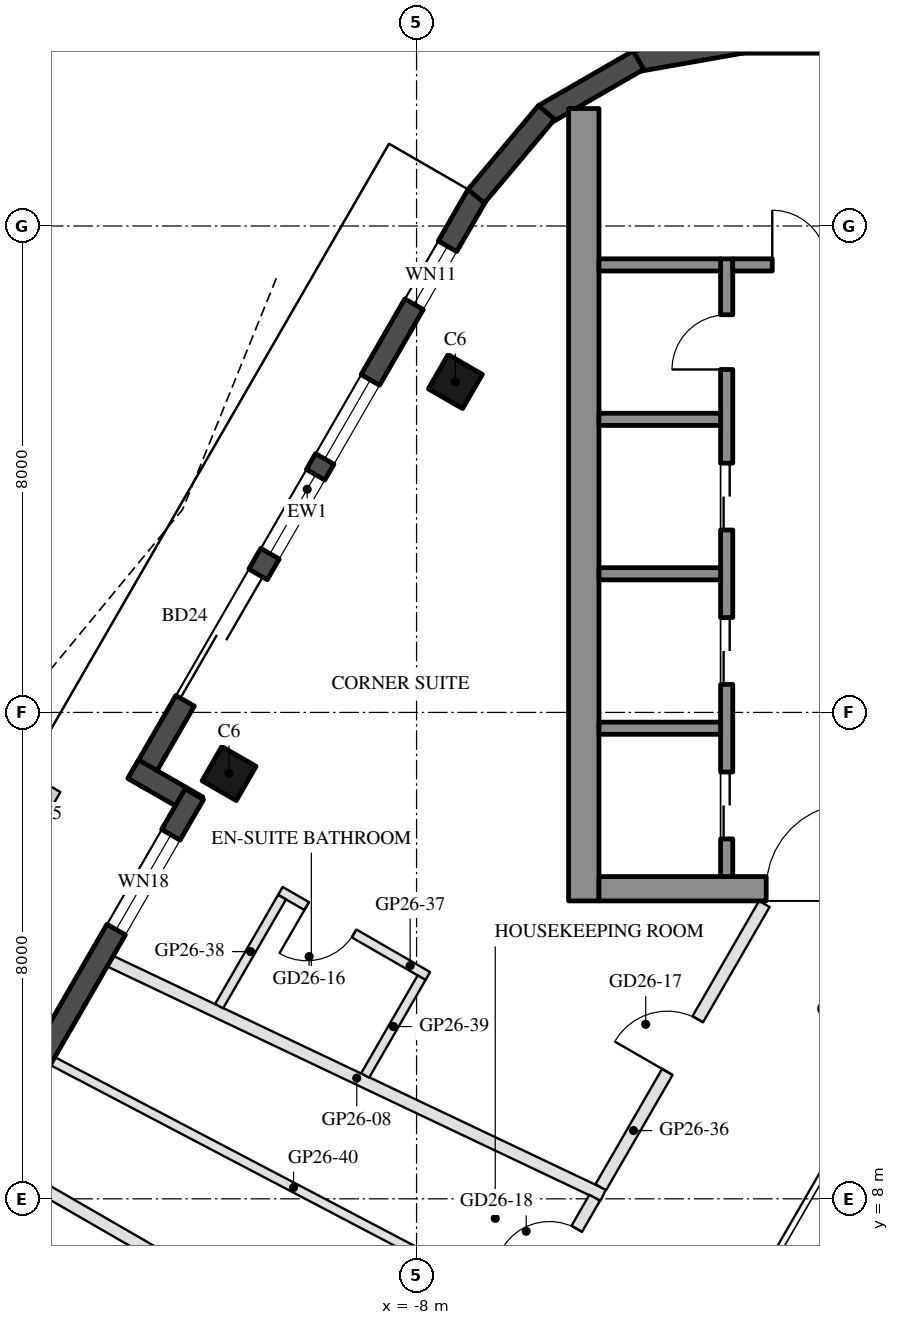
"""IFC4 building model, lengths in metres.
Left out: names, types, materials, properties, quantities, classifications, styles, units other than length and angle.
Written with IfcOpenShell. Run it as: python <this file> out.ifc"""

import sys

from ifc_helpers import new_model, si_unit, direction, frame, frame_2d, origin, origin_2d, place, context, subcontext, project, spatial, rectangle, hollow_rectangle, extrude, boolean, halfspace, element, fill, save


model = new_model("IFC4")
c1 = context("Model", 3, precision=1e-05, world=origin(), true_north=direction((0.0, 1.0)))
c2 = subcontext(c1, "Body", "Model", "MODEL_VIEW")
j1 = project(units=[si_unit("LENGTHUNIT", "METRE"), si_unit("PLANEANGLEUNIT", "RADIAN")], contexts=[c1])
p1 = place(None, origin())
s1 = spatial("IfcSite", under=j1, at=p1, CompositionType="ELEMENT")
p2 = place(p1, origin())
s2 = spatial("IfcBuilding", under=s1, at=p2, CompositionType="ELEMENT")
p3 = place(p2, frame((0.0, 0.0, 272.6)))
s3 = spatial("IfcBuildingStorey", under=s2, at=p3, CompositionType="ELEMENT", Elevation=272.6)
p4 = place(p3, frame((-7.362, 21.44, 0.0), z_axis=(0.0, 0.0, 1.0), x_axis=(0.5, 0.866025403784, 0.0)))
e1 = element("IfcColumn", 1, at=p4, inside=s3, PredefinedType="COLUMN", context=c2, shape_type="SweptSolid", body=[
    boolean("DIFFERENCE", extrude(hollow_rectangle(XDim=0.65, YDim=0.65, WallThickness=0.03, at=origin_2d()), origin(), (0.0, 0.0, 1.0), 3.7), halfspace(frame((0.0, 0.0, 3.653), z_axis=(0.0, 0.0, 1.0), x_axis=(1.0, 0.0, 0.0)), False)),
])
p5 = place(p3, frame((-11.083, 14.994, 0.0), z_axis=(0.0, 0.0, 1.0), x_axis=(0.5, 0.866025403784, 0.0)))
e2 = element("IfcColumn", 2, at=p5, inside=s3, PredefinedType="COLUMN", context=c2, shape_type="SweptSolid", body=[
    boolean("DIFFERENCE", extrude(hollow_rectangle(XDim=0.65, YDim=0.65, WallThickness=0.03, at=origin_2d()), origin(), (0.0, 0.0, 1.0), 3.7), halfspace(frame((0.0, 0.0, 3.66), z_axis=(0.0, 0.0, 1.0), x_axis=(1.0, 0.0, 0.0)), False)),
])
p6 = place(p3, frame((-7.002, 24.514, 0.0), z_axis=(0.0, 0.0, 1.0), x_axis=(-0.500000830309, -0.866024924405, 0.0)))
e3 = element("IfcWall", 3, at=p6, inside=s3, PredefinedType="SOLIDWALL", context=c2, shape_type="SweptSolid", body=[
    extrude(rectangle(XDim=11.185, YDim=0.35, at=frame_2d((5.593, 0.0))), origin(), (0.0, 0.0, 1.0), 3.55),
])
p7 = place(p6, frame((0.979, 0.0, 0.3)))
e4 = element("IfcOpeningElement", 4, at=p7, cuts=e3, PredefinedType="OPENING", context=c2, shape_type="SweptSolid", body=[
    extrude(rectangle(XDim=1.1, YDim=2.65, at=frame_2d((0.55, 1.325))), frame((0.0, 0.185, 0.0), z_axis=(0.0, -1.0, 0.0), x_axis=(1.0, 0.0, 0.0)), (0.0, 0.0, 1.0), 0.37),
])
p8 = place(p6, frame((7.21, 0.0, 0.0)))
e5 = element("IfcOpeningElement", 5, at=p8, cuts=e3, PredefinedType="OPENING", context=c2, shape_type="SweptSolid", body=[
    extrude(rectangle(XDim=2.4, YDim=2.4, at=frame_2d((1.2, 1.2))), frame((0.0, 0.185, 0.0), z_axis=(0.0, -1.0, 0.0), x_axis=(1.0, 0.0, 0.0)), (0.0, 0.0, 1.0), 0.37),
])
p9 = place(p6, frame((3.517, 0.0, 0.3)))
e6 = element("IfcOpeningElement", 6, at=p9, cuts=e3, PredefinedType="OPENING", context=c2, shape_type="SweptSolid", body=[
    extrude(rectangle(XDim=1.5, YDim=2.65, at=frame_2d((0.75, 1.325))), frame((0.0, 0.185, 0.0), z_axis=(0.0, -1.0, 0.0), x_axis=(1.0, 0.0, 0.0)), (0.0, 0.0, 1.0), 0.37),
])
p10 = place(p6, frame((5.316, 0.0, 0.3)))
e7 = element("IfcOpeningElement", 7, at=p10, cuts=e3, PredefinedType="OPENING", context=c2, shape_type="SweptSolid", body=[
    extrude(rectangle(XDim=1.5, YDim=2.65, at=frame_2d((0.75, 1.325))), frame((0.0, 0.185, 0.0), z_axis=(0.0, -1.0, 0.0), x_axis=(1.0, 0.0, 0.0)), (0.0, 0.0, 1.0), 0.37),
])
p11 = place(p3, frame((-12.659, 15.066, 0.0), z_axis=(0.0, 0.0, 1.0), x_axis=(0.866005645448, -0.500034220881, 0.0)))
e8 = element("IfcWall", 8, at=p11, inside=s3, PredefinedType="SOLIDWALL", context=c2, shape_type="SweptSolid", body=[
    extrude(rectangle(XDim=1.22, YDim=0.35, at=frame_2d((0.61, 0.0))), origin(), (0.0, 0.0, 1.0), 3.55),
])
p12 = place(p3, frame((-11.655, 14.655, 0.0), z_axis=(0.0, 0.0, 1.0), x_axis=(-0.499995993298, -0.866027717042, 0.0)))
e9 = element("IfcWall", 9, at=p12, inside=s3, PredefinedType="SOLIDWALL", context=c2, shape_type="SweptSolid", body=[
    extrude(rectangle(XDim=6.284, YDim=0.35, at=frame_2d((3.142, 0.0))), origin(), (0.0, 0.0, 1.0), 3.55),
])
p13 = place(p12, frame((0.77, 0.0, 0.3)))
e10 = element("IfcOpeningElement", 10, at=p13, cuts=e9, PredefinedType="OPENING", context=c2, shape_type="SweptSolid", body=[
    extrude(rectangle(XDim=1.8, YDim=2.65, at=frame_2d((0.9, 1.325))), frame((0.0, 0.185, 0.0), z_axis=(0.0, -1.0, 0.0), x_axis=(1.0, 0.0, 0.0)), (0.0, 0.0, 1.0), 0.37),
])
p14 = place(p3, frame((2.666, 27.018, 0.0), z_axis=(0.0, 0.0, 1.0), x_axis=(-1.0, 0.0, 0.0)))
e11 = element("IfcWall", 11, at=p14, inside=s3, PredefinedType="SOLIDWALL", context=c2, shape_type="SweptSolid", body=[
    extrude(rectangle(XDim=5.331, YDim=0.35, at=frame_2d((2.666, 0.0))), origin(), (0.0, 0.0, 1.0), 3.55),
])
for number, where, z_axis, x_axis in (
    (12, (-2.635, 27.02, 0.0), (0.0, 0.0, 1.0), (-0.985, -0.174, 0.0)),
    (13, (-4.351, 26.729, 0.0), (0.0, 0.0, 1.0), (-0.866, -0.5, 0.0)),
):
    element("IfcWall", number, at=place(p3, frame(where, z_axis=z_axis, x_axis=x_axis)), inside=s3, PredefinedType="SOLIDWALL", context=c2, shape_type="SweptSolid", body=[
        extrude(rectangle(XDim=1.8, YDim=0.35, at=frame_2d((0.9, 0.0))), origin(), (0.0, 0.0, 1.0), 3.55),
    ])
p15 = place(p3, frame((-5.863, 25.868, 0.0), z_axis=(0.0, 0.0, 1.0), x_axis=(-0.642756114672, -0.766070869471, 0.0)))
e14 = element("IfcWall", 14, at=p15, inside=s3, PredefinedType="SOLIDWALL", context=c2, shape_type="SweptSolid", body=[
    extrude(rectangle(XDim=1.8, YDim=0.35, at=frame_2d((0.9, 0.0))), origin(), (0.0, 0.0, 1.0), 3.55),
])
p16 = place(p3, frame((-5.25, 12.9, 0.0), z_axis=(0.0, 0.0, 1.0), x_axis=(0.0, 1.0, 0.0)))
e15 = element("IfcWall", 15, at=p16, inside=s3, PredefinedType="SHEAR", context=c2, shape_type="SweptSolid", body=[
    extrude(rectangle(XDim=13.031, YDim=0.5, at=frame_2d((6.516, 0.0))), origin(), (0.0, 0.0, 1.0), 3.5),
])
p17 = place(p3, frame((5.0, 13.1, 0.0), z_axis=(0.0, 0.0, 1.0), x_axis=(-1.0, 0.0, 0.0)))
e16 = element("IfcWall", 16, at=p17, inside=s3, PredefinedType="SHEAR", context=c2, shape_type="SweptSolid", body=[
    extrude(rectangle(XDim=10.0, YDim=0.4, at=frame_2d((5.0, 0.0))), origin(), (0.0, 0.0, 1.0), 3.5),
])
p18 = place(p17, frame((3.55, 0.0, 0.0)))
e17 = element("IfcOpeningElement", 17, at=p18, cuts=e16, PredefinedType="OPENING", context=c2, shape_type="SweptSolid", body=[
    extrude(rectangle(XDim=1.1, YDim=2.1, at=frame_2d((0.55, 1.05))), frame((0.0, 0.21, 0.0), z_axis=(0.0, -1.0, 0.0), x_axis=(1.0, 0.0, 0.0)), (0.0, 0.0, 1.0), 0.42),
])
p19 = place(p17, frame((5.85, 0.0, 0.0)))
e18 = element("IfcOpeningElement", 18, at=p19, cuts=e16, PredefinedType="OPENING", context=c2, shape_type="SweptSolid", body=[
    extrude(rectangle(XDim=1.4, YDim=2.1, at=frame_2d((0.7, 1.05))), frame((0.0, 0.21, 0.0), z_axis=(0.0, -1.0, 0.0), x_axis=(1.0, 0.0, 0.0)), (0.0, 0.0, 1.0), 0.42),
])
p20 = place(p3, frame((-2.9, 13.3, 0.0), z_axis=(0.0, 0.0, 1.0), x_axis=(0.0, 1.0, 0.0)))
e19 = element("IfcWall", 19, at=p20, inside=s3, PredefinedType="SHEAR", context=c2, shape_type="SweptSolid", body=[
    extrude(rectangle(XDim=10.16, YDim=0.2, at=frame_2d((5.08, 0.0))), origin(), (0.0, 0.0, 1.0), 3.5),
])
p21 = place(p20, frame((0.62, 0.0, 0.0)))
e20 = element("IfcOpeningElement", 20, at=p21, cuts=e19, PredefinedType="OPENING", context=c2, shape_type="SweptSolid", body=[
    extrude(rectangle(XDim=1.1, YDim=2.1, at=frame_2d((0.55, 1.05))), frame((0.0, 0.11, 0.0), z_axis=(0.0, -1.0, 0.0), x_axis=(1.0, 0.0, 0.0)), (0.0, 0.0, 1.0), 0.22),
])
p22 = place(p20, frame((3.16, 0.0, 0.0)))
e21 = element("IfcOpeningElement", 21, at=p22, cuts=e19, PredefinedType="OPENING", context=c2, shape_type="SweptSolid", body=[
    extrude(rectangle(XDim=1.1, YDim=2.1, at=frame_2d((0.55, 1.05))), frame((0.0, 0.11, 0.0), z_axis=(0.0, -1.0, 0.0), x_axis=(1.0, 0.0, 0.0)), (0.0, 0.0, 1.0), 0.22),
])
p23 = place(p20, frame((5.7, 0.0, 0.0)))
e22 = element("IfcOpeningElement", 22, at=p23, cuts=e19, PredefinedType="OPENING", context=c2, shape_type="SweptSolid", body=[
    extrude(rectangle(XDim=1.1, YDim=2.1, at=frame_2d((0.55, 1.05))), frame((0.0, 0.11, 0.0), z_axis=(0.0, -1.0, 0.0), x_axis=(1.0, 0.0, 0.0)), (0.0, 0.0, 1.0), 0.22),
])
p24 = place(p20, frame((8.34, 0.0, 0.0)))
e23 = element("IfcOpeningElement", 23, at=p24, cuts=e19, PredefinedType="OPENING", context=c2, shape_type="SweptSolid", body=[
    extrude(rectangle(XDim=0.9, YDim=2.1, at=frame_2d((0.45, 1.05))), frame((0.0, 0.11, 0.0), z_axis=(0.0, -1.0, 0.0), x_axis=(1.0, 0.0, 0.0)), (0.0, 0.0, 1.0), 0.22),
])
p25 = place(p3, frame((-0.4, 23.36, 0.0), z_axis=(0.0, 0.0, 1.0), x_axis=(-1.0, 0.0, 0.0)))
e24 = element("IfcWall", 24, at=p25, inside=s3, PredefinedType="SHEAR", context=c2, shape_type="SweptSolid", body=[
    extrude(rectangle(XDim=2.4, YDim=0.2, at=frame_2d((1.2, 0.0))), origin(), (0.0, 0.0, 1.0), 3.5),
])
p26 = place(p25, frame((0.85, 0.0, 0.0)))
e25 = element("IfcOpeningElement", 25, at=p26, cuts=e24, PredefinedType="OPENING", context=c2, shape_type="SweptSolid", body=[
    extrude(rectangle(XDim=0.9, YDim=2.1, at=frame_2d((0.45, 1.05))), frame((0.0, 0.11, 0.0), z_axis=(0.0, -1.0, 0.0), x_axis=(1.0, 0.0, 0.0)), (0.0, 0.0, 1.0), 0.22),
])
for number, where, z_axis, x_axis in (
    (26, (-3.0, 15.74, 0.0), (0.0, 0.0, 1.0), (-1.0, 0.0, 0.0)),
    (27, (-3.0, 18.28, 0.0), (0.0, 0.0, 1.0), (-1.0, 0.0, 0.0)),
    (28, (-3.0, 20.82, 0.0), (0.0, 0.0, 1.0), (-1.0, 0.0, 0.0)),
    (29, (-3.0, 23.36, 0.0), (0.0, 0.0, 1.0), (-1.0, 0.0, 0.0)),
):
    element("IfcWall", number, at=place(p3, frame(where, z_axis=z_axis, x_axis=x_axis)), inside=s3, PredefinedType="SHEAR", context=c2, shape_type="SweptSolid", body=[
        extrude(rectangle(XDim=2.0, YDim=0.2, at=frame_2d((1.0, 0.0))), origin(), (0.0, 0.0, 1.0), 3.5),
    ])
p27 = place(p3, frame((-13.038, 11.909, 0.0), z_axis=(0.0, 0.0, 1.0), x_axis=(0.903427417518, -0.428741065536, 0.0)))
e30 = element("IfcWall", 30, at=p27, inside=s3, PredefinedType="PARTITIONING", context=c2, shape_type="SweptSolid", body=[
    extrude(rectangle(XDim=8.975, YDim=0.2, at=frame_2d((4.487, 0.0))), origin(), (0.0, 0.0, 1.0), 3.0),
])
p28 = place(p3, frame((-14.524, 8.385, 0.0), z_axis=(0.0, 0.0, 1.0), x_axis=(0.866015680395, -0.500016841027, 0.0)))
e31 = element("IfcWall", 31, at=p28, inside=s3, PredefinedType="PARTITIONING", context=c2, shape_type="SweptSolid", body=[
    extrude(rectangle(XDim=8.471, YDim=0.2, at=frame_2d((4.235, 0.0))), origin(), (0.0, 0.0, 1.0), 3.0),
])
p29 = place(p3, frame((-4.97, 8.191, 0.0), z_axis=(0.0, 0.0, 1.0), x_axis=(0.499994808408, 0.866028401131, 0.0)))
e32 = element("IfcWall", 32, at=p29, inside=s3, PredefinedType="PARTITIONING", context=c2, shape_type="SweptSolid", body=[
    extrude(rectangle(XDim=5.38, YDim=0.2, at=frame_2d((2.69, 0.0))), origin(), (0.0, 0.0, 1.0), 3.0),
])
p30 = place(p29, frame((2.19, 0.0, 0.0)))
e33 = element("IfcOpeningElement", 33, at=p30, cuts=e32, PredefinedType="OPENING", context=c2, shape_type="SweptSolid", body=[
    extrude(rectangle(XDim=1.0, YDim=2.1, at=frame_2d((0.5, 1.05))), frame((0.0, 0.11, 0.0), z_axis=(0.0, -1.0, 0.0), x_axis=(1.0, 0.0, 0.0)), (0.0, 0.0, 1.0), 0.22),
])
p31 = place(p3, frame((-7.815, 11.665, 0.0), z_axis=(0.0, 0.0, 1.0), x_axis=(-0.865996816683, 0.500049511043, 0.0)))
e34 = element("IfcWall", 34, at=p31, inside=s3, PredefinedType="PARTITIONING", context=c2, shape_type="SweptSolid", body=[
    extrude(rectangle(XDim=2.8, YDim=0.15, at=frame_2d((1.4, 0.0))), origin(), (0.0, 0.0, 1.0), 3.55),
])
p32 = place(p31, frame((1.4, 0.0, 0.0)))
e35 = element("IfcOpeningElement", 35, at=p32, cuts=e34, PredefinedType="OPENING", context=c2, shape_type="SweptSolid", body=[
    extrude(rectangle(XDim=0.9, YDim=2.1, at=frame_2d((0.45, 1.05))), frame((0.0, 0.085, 0.0), z_axis=(0.0, -1.0, 0.0), x_axis=(1.0, 0.0, 0.0)), (0.0, 0.0, 1.0), 0.17),
])
p33 = place(p3, frame((-10.212, 12.962, 0.0), z_axis=(0.0, 0.0, 1.0), x_axis=(-0.500008344384, -0.866020586098, 0.0)))
e36 = element("IfcWall", 36, at=p33, inside=s3, PredefinedType="PARTITIONING", context=c2, shape_type="SweptSolid", body=[
    extrude(rectangle(XDim=2.07, YDim=0.15, at=frame_2d((1.035, 0.0))), origin(), (0.0, 0.0, 1.0), 3.55),
])
p34 = place(p3, frame((-7.917, 11.637, 0.0), z_axis=(0.0, 0.0, 1.0), x_axis=(-0.500071598593, -0.865984062371, 0.0)))
e37 = element("IfcWall", 37, at=p34, inside=s3, PredefinedType="PARTITIONING", context=c2, shape_type="SweptSolid", body=[
    extrude(rectangle(XDim=1.856, YDim=0.15, at=frame_2d((0.928, 0.0))), origin(), (0.0, 0.0, 1.0), 3.55),
])
p35 = place(p3, frame((-13.987, 10.266, 0.0), z_axis=(0.0, 0.0, 1.0), x_axis=(0.885474206285, -0.464688530097, 0.0)))
e38 = element("IfcWall", 38, at=p35, inside=s3, PredefinedType="PARTITIONING", context=c2, shape_type="SweptSolid", body=[
    extrude(rectangle(XDim=8.953, YDim=0.15, at=frame_2d((4.477, 0.0))), origin(), (0.0, 0.0, 1.0), 3.1),
])
p36 = place(p3, frame((-6.11, 6.217, 0.0), z_axis=(0.0, 0.0, 1.0), x_axis=(0.500017307165, 0.866015411258, 0.0)))
e39 = element("IfcWall", 39, at=p36, inside=s3, PredefinedType="PARTITIONING", context=c2, shape_type="SweptSolid", body=[
    extrude(rectangle(XDim=2.079, YDim=0.2, at=frame_2d((1.039, 0.0))), origin(), (0.0, 0.0, 1.0), 3.0),
])
p37 = place(p36, frame((0.589, 0.0, 0.0)))
e40 = element("IfcOpeningElement", 40, at=p37, cuts=e39, PredefinedType="OPENING", context=c2, shape_type="SweptSolid", body=[
    extrude(rectangle(XDim=0.9, YDim=2.1, at=frame_2d((0.45, 1.05))), frame((0.0, 0.11, 0.0), z_axis=(0.0, -1.0, 0.0), x_axis=(1.0, 0.0, 0.0)), (0.0, 0.0, 1.0), 0.22),
])
p38 = place(p7, origin())
e41 = element("IfcWindow", 41, at=p38, inside=s3, PartitioningType="SINGLE_PANEL", PredefinedType="WINDOW", context=c2, shape_type="SweptSolid", body=[
    extrude(rectangle(XDim=1.1, YDim=2.65, at=frame_2d((0.55, 1.325))), frame((0.0, 0.03, 0.0), z_axis=(0.0, -1.0, 0.0), x_axis=(1.0, 0.0, 0.0)), (0.0, 0.0, 1.0), 0.06),
])
fill(e4, e41)
p39 = place(p8, frame((2.4, 0.0, 0.0), z_axis=(0.0, 0.0, 1.0), x_axis=(-1.0, 0.0, 0.0)))
e42 = element("IfcDoor", 42, at=p39, inside=s3, OperationType="SLIDING_TO_LEFT", PredefinedType="DOOR", context=c2, shape_type="SweptSolid", body=[
    extrude(rectangle(XDim=2.4, YDim=2.4, at=frame_2d((1.2, 1.2))), frame((0.0, 0.025, 0.0), z_axis=(0.0, -1.0, 0.0), x_axis=(1.0, 0.0, 0.0)), (0.0, 0.0, 1.0), 0.05),
])
fill(e5, e42)
p40 = place(p9, origin())
e43 = element("IfcWindow", 43, at=p40, inside=s3, PartitioningType="SINGLE_PANEL", PredefinedType="WINDOW", context=c2, shape_type="SweptSolid", body=[
    extrude(rectangle(XDim=1.5, YDim=2.65, at=frame_2d((0.75, 1.325))), frame((0.0, 0.03, 0.0), z_axis=(0.0, -1.0, 0.0), x_axis=(1.0, 0.0, 0.0)), (0.0, 0.0, 1.0), 0.06),
])
fill(e6, e43)
p41 = place(p10, origin())
e44 = element("IfcWindow", 44, at=p41, inside=s3, PartitioningType="SINGLE_PANEL", PredefinedType="WINDOW", context=c2, shape_type="SweptSolid", body=[
    extrude(rectangle(XDim=1.5, YDim=2.65, at=frame_2d((0.75, 1.325))), frame((0.0, 0.03, 0.0), z_axis=(0.0, -1.0, 0.0), x_axis=(1.0, 0.0, 0.0)), (0.0, 0.0, 1.0), 0.06),
])
fill(e7, e44)
p42 = place(p13, origin())
e45 = element("IfcWindow", 45, at=p42, inside=s3, PartitioningType="SINGLE_PANEL", PredefinedType="WINDOW", context=c2, shape_type="SweptSolid", body=[
    extrude(rectangle(XDim=1.8, YDim=2.65, at=frame_2d((0.9, 1.325))), frame((0.0, 0.03, 0.0), z_axis=(0.0, -1.0, 0.0), x_axis=(1.0, 0.0, 0.0)), (0.0, 0.0, 1.0), 0.06),
])
fill(e10, e45)
p43 = place(p21, origin())
e46 = element("IfcDoor", 46, at=p43, inside=s3, OperationType="DOUBLE_DOOR_SLIDING", PredefinedType="DOOR", context=c2, shape_type="SweptSolid", body=[
    extrude(rectangle(XDim=1.1, YDim=2.1, at=frame_2d((0.55, 1.05))), frame((0.0, 0.025, 0.0), z_axis=(0.0, -1.0, 0.0), x_axis=(1.0, 0.0, 0.0)), (0.0, 0.0, 1.0), 0.05),
])
fill(e20, e46)
p44 = place(p22, origin())
e47 = element("IfcDoor", 47, at=p44, inside=s3, OperationType="DOUBLE_DOOR_SLIDING", PredefinedType="DOOR", context=c2, shape_type="SweptSolid", body=[
    extrude(rectangle(XDim=1.1, YDim=2.1, at=frame_2d((0.55, 1.05))), frame((0.0, 0.025, 0.0), z_axis=(0.0, -1.0, 0.0), x_axis=(1.0, 0.0, 0.0)), (0.0, 0.0, 1.0), 0.05),
])
fill(e21, e47)
p45 = place(p23, origin())
e48 = element("IfcDoor", 48, at=p45, inside=s3, OperationType="DOUBLE_DOOR_SLIDING", PredefinedType="DOOR", context=c2, shape_type="SweptSolid", body=[
    extrude(rectangle(XDim=1.1, YDim=2.1, at=frame_2d((0.55, 1.05))), frame((0.0, 0.025, 0.0), z_axis=(0.0, -1.0, 0.0), x_axis=(1.0, 0.0, 0.0)), (0.0, 0.0, 1.0), 0.05),
])
fill(e22, e48)
p46 = place(p24, origin())
e49 = element("IfcDoor", 49, at=p46, inside=s3, OperationType="SINGLE_SWING_LEFT", PredefinedType="DOOR", context=c2, shape_type="SweptSolid", body=[
    extrude(rectangle(XDim=0.9, YDim=2.1, at=frame_2d((0.45, 1.05))), frame((0.0, 0.025, 0.0), z_axis=(0.0, -1.0, 0.0), x_axis=(1.0, 0.0, 0.0)), (0.0, 0.0, 1.0), 0.05),
])
fill(e23, e49)
p47 = place(p26, frame((0.9, 0.0, 0.0), z_axis=(0.0, 0.0, 1.0), x_axis=(-1.0, 0.0, 0.0)))
e50 = element("IfcDoor", 50, at=p47, inside=s3, OperationType="SINGLE_SWING_LEFT", PredefinedType="DOOR", context=c2, shape_type="SweptSolid", body=[
    extrude(rectangle(XDim=0.9, YDim=2.1, at=frame_2d((0.45, 1.05))), frame((0.0, 0.025, 0.0), z_axis=(0.0, -1.0, 0.0), x_axis=(1.0, 0.0, 0.0)), (0.0, 0.0, 1.0), 0.05),
])
fill(e25, e50)
p48 = place(p19, frame((1.4, 0.0, 0.0), z_axis=(0.0, 0.0, 1.0), x_axis=(-1.0, 0.0, 0.0)))
e51 = element("IfcDoor", 51, at=p48, inside=s3, OperationType="DOUBLE_DOOR_SINGLE_SWING", PredefinedType="DOOR", context=c2, shape_type="SweptSolid", body=[
    extrude(rectangle(XDim=1.4, YDim=2.1, at=frame_2d((0.7, 1.05))), frame((0.0, 0.025, 0.0), z_axis=(0.0, -1.0, 0.0), x_axis=(1.0, 0.0, 0.0)), (0.0, 0.0, 1.0), 0.05),
])
fill(e18, e51)
p49 = place(p32, origin())
e52 = element("IfcDoor", 52, at=p49, inside=s3, OperationType="SINGLE_SWING_RIGHT", PredefinedType="DOOR", context=c2, shape_type="SweptSolid", body=[
    extrude(rectangle(XDim=0.9, YDim=2.1, at=frame_2d((0.45, 1.05))), frame((0.0, 0.025, 0.0), z_axis=(0.0, -1.0, 0.0), x_axis=(1.0, 0.0, 0.0)), (0.0, 0.0, 1.0), 0.05),
])
fill(e35, e52)
p50 = place(p30, origin())
e53 = element("IfcDoor", 53, at=p50, inside=s3, OperationType="SINGLE_SWING_LEFT", PredefinedType="DOOR", context=c2, shape_type="SweptSolid", body=[
    extrude(rectangle(XDim=1.0, YDim=2.1, at=frame_2d((0.5, 1.05))), frame((0.0, 0.025, 0.0), z_axis=(0.0, -1.0, 0.0), x_axis=(1.0, 0.0, 0.0)), (0.0, 0.0, 1.0), 0.05),
])
fill(e33, e53)
p51 = place(p37, origin())
e54 = element("IfcDoor", 54, at=p51, inside=s3, OperationType="SINGLE_SWING_LEFT", PredefinedType="DOOR", context=c2, shape_type="SweptSolid", body=[
    extrude(rectangle(XDim=0.9, YDim=2.1, at=frame_2d((0.45, 1.05))), frame((0.0, 0.025, 0.0), z_axis=(0.0, -1.0, 0.0), x_axis=(1.0, 0.0, 0.0)), (0.0, 0.0, 1.0), 0.05),
])
fill(e40, e54)
save(model, sys.argv[1])
